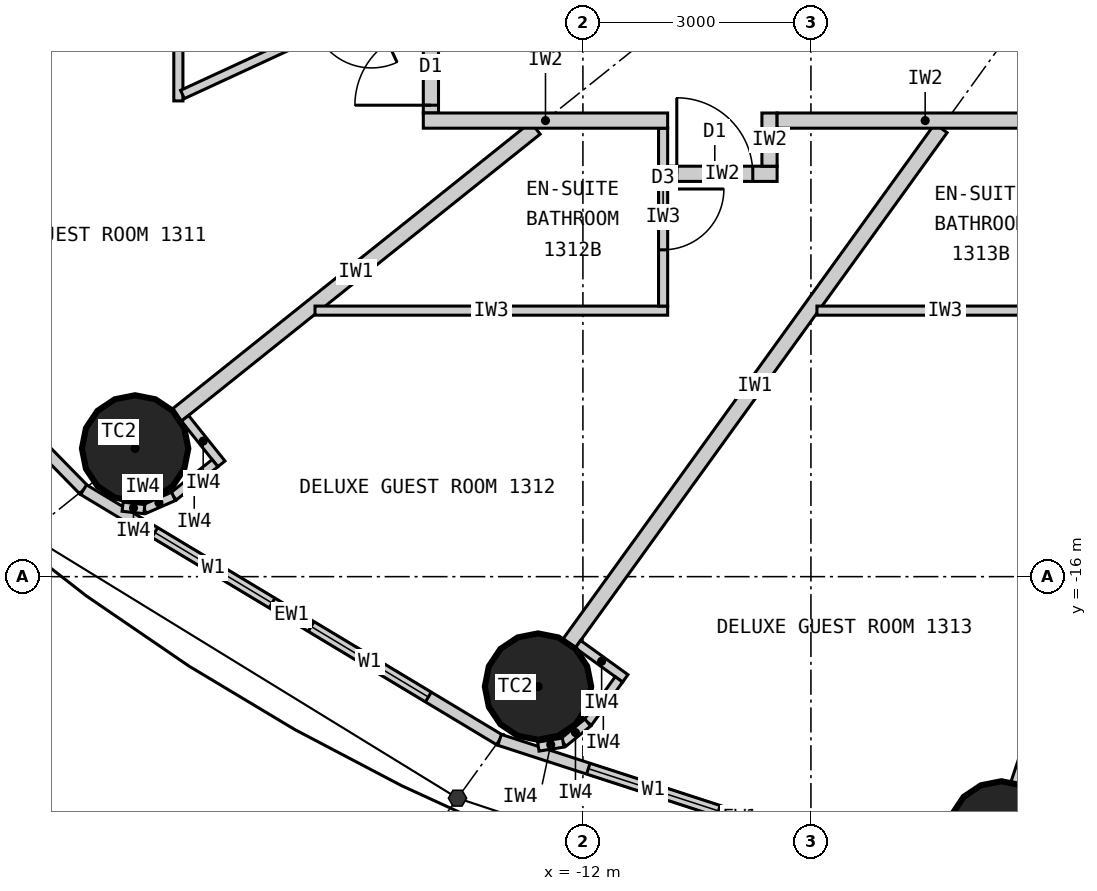
"""IFC4 building model, lengths in metres.
Left out: names, types, materials, properties, quantities, classifications, styles, units other than length and angle.
Written with IfcOpenShell. Run it as: python <this file> out.ifc"""

import sys

from ifc_helpers import new_model, si_unit, direction, frame, frame_2d, origin, origin_2d, place, context, subcontext, project, spatial, rectangle, circle, extrude, element, fill, save


model = new_model("IFC4")
c1 = context("Model", 3, precision=1e-05, world=origin(), true_north=direction((0.0, 1.0)))
c2 = subcontext(c1, "Body", "Model", "MODEL_VIEW")
j1 = project(units=[si_unit("LENGTHUNIT", "METRE"), si_unit("PLANEANGLEUNIT", "RADIAN")], contexts=[c1])
p1 = place(None, origin())
s1 = spatial("IfcSite", under=j1, at=p1, CompositionType="ELEMENT")
p2 = place(p1, origin())
s2 = spatial("IfcBuilding", under=s1, at=p2, CompositionType="ELEMENT")
p3 = place(p2, frame((0.0, 0.0, 57.3)))
s3 = spatial("IfcBuildingStorey", under=s2, at=p3, CompositionType="ELEMENT", Elevation=57.3)
for number, where, z_axis, x_axis in (
    (1, (-17.892, -14.313, 0.0), (0.0, 0.0, 1.0), (1.0, 0.0, 0.0)),
    (2, (-12.591, -17.447, 0.0), (0.0, 0.0, 1.0), (1.0, 0.0, 0.0)),
    (3, (-6.495, -19.391, 0.0), (0.0, 0.0, 1.0), (1.0, 0.0, 0.0)),
):
    element("IfcColumn", number, at=place(p3, frame(where, z_axis=z_axis, x_axis=x_axis)), inside=s3, PredefinedType="COLUMN", context=c2, shape_type="SweptSolid", body=[
        extrude(circle(Radius=0.7, at=origin_2d()), origin(), (0.0, 0.0, 1.0), 3.3),
    ])
p4 = place(p3, frame((-22.803, -10.532, 0.0), z_axis=(0.0, 0.0, 1.0), x_axis=(0.699602905915, -0.714531856557, 0.0)))
e4 = element("IfcWall", 4, at=p4, inside=s3, PredefinedType="ELEMENTEDWALL", context=c2, shape_type="SweptSolid", body=[
    extrude(rectangle(XDim=6.051, YDim=0.15, at=frame_2d((3.025, 0.0))), origin(), (0.0, 0.0, 1.0), 3.12),
])
p5 = place(p4, frame((0.926, 0.0, 0.9)))
e5 = element("IfcOpeningElement", 5, at=p5, cuts=e4, PredefinedType="OPENING", context=c2, shape_type="SweptSolid", body=[
    extrude(rectangle(XDim=1.8, YDim=1.9, at=frame_2d((0.9, 0.95))), frame((0.0, 0.085, 0.0), z_axis=(0.0, -1.0, 0.0), x_axis=(1.0, 0.0, 0.0)), (0.0, 0.0, 1.0), 0.17),
])
p6 = place(p4, frame((3.325, 0.0, 0.9)))
e6 = element("IfcOpeningElement", 6, at=p6, cuts=e4, PredefinedType="OPENING", context=c2, shape_type="SweptSolid", body=[
    extrude(rectangle(XDim=1.8, YDim=1.9, at=frame_2d((0.9, 0.95))), frame((0.0, 0.085, 0.0), z_axis=(0.0, -1.0, 0.0), x_axis=(1.0, 0.0, 0.0)), (0.0, 0.0, 1.0), 0.17),
])
p7 = place(p3, frame((-18.57, -14.856, 0.0), z_axis=(0.0, 0.0, 1.0), x_axis=(0.856983180864, -0.515344377787, 0.0)))
e7 = element("IfcWall", 7, at=p7, inside=s3, PredefinedType="ELEMENTEDWALL", context=c2, shape_type="SweptSolid", body=[
    extrude(rectangle(XDim=6.386, YDim=0.15, at=frame_2d((3.193, 0.0))), origin(), (0.0, 0.0, 1.0), 3.12),
])
p8 = place(p7, frame((1.093, 0.0, 0.9)))
e8 = element("IfcOpeningElement", 8, at=p8, cuts=e7, PredefinedType="OPENING", context=c2, shape_type="SweptSolid", body=[
    extrude(rectangle(XDim=1.8, YDim=1.9, at=frame_2d((0.9, 0.95))), frame((0.0, 0.085, 0.0), z_axis=(0.0, -1.0, 0.0), x_axis=(1.0, 0.0, 0.0)), (0.0, 0.0, 1.0), 0.17),
])
p9 = place(p7, frame((3.493, 0.0, 0.9)))
e9 = element("IfcOpeningElement", 9, at=p9, cuts=e7, PredefinedType="OPENING", context=c2, shape_type="SweptSolid", body=[
    extrude(rectangle(XDim=1.8, YDim=1.9, at=frame_2d((0.9, 0.95))), frame((0.0, 0.085, 0.0), z_axis=(0.0, -1.0, 0.0), x_axis=(1.0, 0.0, 0.0)), (0.0, 0.0, 1.0), 0.17),
])
p10 = place(p3, frame((-13.096, -18.147, 0.0), z_axis=(0.0, 0.0, 1.0), x_axis=(0.951137534625, -0.308767534285, 0.0)))
e10 = element("IfcWall", 10, at=p10, inside=s3, PredefinedType="ELEMENTEDWALL", context=c2, shape_type="SweptSolid", body=[
    extrude(rectangle(XDim=6.655, YDim=0.15, at=frame_2d((3.328, 0.0))), origin(), (0.0, 0.0, 1.0), 3.12),
])
p11 = place(p10, frame((1.228, 0.0, 0.9)))
e11 = element("IfcOpeningElement", 11, at=p11, cuts=e10, PredefinedType="OPENING", context=c2, shape_type="SweptSolid", body=[
    extrude(rectangle(XDim=1.8, YDim=1.9, at=frame_2d((0.9, 0.95))), frame((0.0, 0.085, 0.0), z_axis=(0.0, -1.0, 0.0), x_axis=(1.0, 0.0, 0.0)), (0.0, 0.0, 1.0), 0.17),
])
p12 = place(p10, frame((3.628, 0.0, 0.9)))
e12 = element("IfcOpeningElement", 12, at=p12, cuts=e10, PredefinedType="OPENING", context=c2, shape_type="SweptSolid", body=[
    extrude(rectangle(XDim=1.8, YDim=1.9, at=frame_2d((0.9, 0.95))), frame((0.0, 0.085, 0.0), z_axis=(0.0, -1.0, 0.0), x_axis=(1.0, 0.0, 0.0)), (0.0, 0.0, 1.0), 0.17),
])
p13 = place(p3, frame((-14.1, -6.512, 0.0), z_axis=(0.0, 0.0, 1.0), x_axis=(-0.907832871056, -0.419332181247, 0.0)))
e13 = element("IfcWall", 13, at=p13, inside=s3, PredefinedType="PARTITIONING", context=c2, shape_type="SweptSolid", body=[
    extrude(rectangle(XDim=8.023, YDim=0.2, at=frame_2d((4.011, 0.0))), origin(), (0.0, 0.0, 1.0), 2.32),
])
p14 = place(p3, frame((-12.625, -10.1, 0.0), z_axis=(0.0, 0.0, 1.0), x_axis=(-0.780892451574, -0.624665493744, 0.0)))
e14 = element("IfcWall", 14, at=p14, inside=s3, PredefinedType="PARTITIONING", context=c2, shape_type="SweptSolid", body=[
    extrude(rectangle(XDim=6.045, YDim=0.2, at=frame_2d((3.022, 0.0))), origin(), (0.0, 0.0, 1.0), 2.32),
])
p15 = place(p3, frame((-7.289, -10.1, 0.0), z_axis=(0.0, 0.0, 1.0), x_axis=(-0.585198353053, -0.810890182197, 0.0)))
e15 = element("IfcWall", 15, at=p15, inside=s3, PredefinedType="PARTITIONING", context=c2, shape_type="SweptSolid", body=[
    extrude(rectangle(XDim=8.36, YDim=0.2, at=frame_2d((4.18, 0.0))), origin(), (0.0, 0.0, 1.0), 2.32),
])
p16 = place(p3, frame((-3.383, -10.1, 0.0), z_axis=(0.0, 0.0, 1.0), x_axis=(-0.31759592231, -0.948226149256, 0.0)))
e16 = element("IfcWall", 16, at=p16, inside=s3, PredefinedType="PARTITIONING", context=c2, shape_type="SweptSolid", body=[
    extrude(rectangle(XDim=9.098, YDim=0.2, at=frame_2d((4.549, 0.0))), origin(), (0.0, 0.0, 1.0), 2.32),
])
p17 = place(p3, frame((-17.323, -8.101, 0.0), z_axis=(0.0, 0.0, 1.0), x_axis=(0.0, -1.0, 0.0)))
e17 = element("IfcWall", 17, at=p17, inside=s3, PredefinedType="PARTITIONING", context=c2, shape_type="SweptSolid", body=[
    extrude(rectangle(XDim=1.64, YDim=0.12, at=frame_2d((0.82, 0.0))), origin(), (0.0, 0.0, 1.0), 3.12),
])
p18 = place(p3, frame((-14.1, -8.193, 0.0), z_axis=(0.0, 0.0, 1.0), x_axis=(-0.907836493557, -0.419324338628, 0.0)))
e18 = element("IfcWall", 18, at=p18, inside=s3, PredefinedType="PARTITIONING", context=c2, shape_type="SweptSolid", body=[
    extrude(rectangle(XDim=3.49, YDim=0.12, at=frame_2d((1.745, 0.0))), origin(), (0.0, 0.0, 1.0), 3.12),
])
p19 = place(p18, frame((0.75, 0.0, 0.0)))
e19 = element("IfcOpeningElement", 19, at=p19, cuts=e18, PredefinedType="OPENING", context=c2, shape_type="SweptSolid", body=[
    extrude(rectangle(XDim=0.8, YDim=2.1, at=frame_2d((0.4, 1.05))), frame((0.0, 0.07, 0.0), z_axis=(0.0, -1.0, 0.0), x_axis=(1.0, 0.0, 0.0)), (0.0, 0.0, 1.0), 0.14),
])
p20 = place(p3, frame((-15.525, -12.5, 0.0), z_axis=(0.0, 0.0, 1.0), x_axis=(1.0, 0.0, 0.0)))
e20 = element("IfcWall", 20, at=p20, inside=s3, PredefinedType="PARTITIONING", context=c2, shape_type="SweptSolid", body=[
    extrude(rectangle(XDim=4.64, YDim=0.12, at=frame_2d((2.32, 0.0))), origin(), (0.0, 0.0, 1.0), 3.12),
])
p21 = place(p3, frame((-10.945, -10.1, 0.0), z_axis=(0.0, 0.0, 1.0), x_axis=(0.0, -1.0, 0.0)))
e21 = element("IfcWall", 21, at=p21, inside=s3, PredefinedType="PARTITIONING", context=c2, shape_type="SweptSolid", body=[
    extrude(rectangle(XDim=2.34, YDim=0.12, at=frame_2d((1.17, 0.0))), origin(), (0.0, 0.0, 1.0), 3.12),
])
p22 = place(p21, frame((0.8, 0.0, 0.0)))
e22 = element("IfcOpeningElement", 22, at=p22, cuts=e21, PredefinedType="OPENING", context=c2, shape_type="SweptSolid", body=[
    extrude(rectangle(XDim=0.8, YDim=2.1, at=frame_2d((0.4, 1.05))), frame((0.0, 0.07, 0.0), z_axis=(0.0, -1.0, 0.0), x_axis=(1.0, 0.0, 0.0)), (0.0, 0.0, 1.0), 0.14),
])
p23 = place(p3, frame((-8.921, -12.5, 0.0), z_axis=(0.0, 0.0, 1.0), x_axis=(1.0, 0.0, 0.0)))
e23 = element("IfcWall", 23, at=p23, inside=s3, PredefinedType="PARTITIONING", context=c2, shape_type="SweptSolid", body=[
    extrude(rectangle(XDim=3.372, YDim=0.12, at=frame_2d((1.686, 0.0))), origin(), (0.0, 0.0, 1.0), 3.12),
])
p24 = place(p3, frame((-9.445, -10.7, 0.0), z_axis=(0.0, 0.0, 1.0), x_axis=(-1.0, 0.0, 0.0)))
e24 = element("IfcWall", 24, at=p24, inside=s3, PredefinedType="PARTITIONING", context=c2, shape_type="SweptSolid", body=[
    extrude(rectangle(XDim=1.44, YDim=0.2, at=frame_2d((0.72, 0.0))), origin(), (0.0, 0.0, 1.0), 3.12),
])
p25 = place(p24, frame((0.32, 0.0, 0.0)))
e25 = element("IfcOpeningElement", 25, at=p25, cuts=e24, PredefinedType="OPENING", context=c2, shape_type="SweptSolid", body=[
    extrude(rectangle(XDim=1.0, YDim=2.2, at=frame_2d((0.5, 1.1))), frame((0.0, 0.11, 0.0), z_axis=(0.0, -1.0, 0.0), x_axis=(1.0, 0.0, 0.0)), (0.0, 0.0, 1.0), 0.22),
])
p26 = place(p3, frame((-9.545, -9.9, 0.0), z_axis=(0.0, 0.0, 1.0), x_axis=(0.0, -1.0, 0.0)))
e26 = element("IfcWall", 26, at=p26, inside=s3, PredefinedType="PARTITIONING", context=c2, shape_type="SweptSolid", body=[
    extrude(rectangle(XDim=0.7, YDim=0.2, at=frame_2d((0.35, 0.0))), origin(), (0.0, 0.0, 1.0), 3.12),
])
p27 = place(p3, frame((-14.0, -4.772, 0.0), z_axis=(0.0, 0.0, 1.0), x_axis=(0.0, -1.0, 0.0)))
e27 = element("IfcWall", 27, at=p27, inside=s3, PredefinedType="PARTITIONING", context=c2, shape_type="SweptSolid", body=[
    extrude(rectangle(XDim=5.127, YDim=0.2, at=frame_2d((2.564, 0.0))), origin(), (0.0, 0.0, 1.0), 3.12),
])
p28 = place(p27, frame((4.025, 0.0, 0.0)))
e28 = element("IfcOpeningElement", 28, at=p28, cuts=e27, PredefinedType="OPENING", context=c2, shape_type="SweptSolid", body=[
    extrude(rectangle(XDim=1.0, YDim=2.2, at=frame_2d((0.5, 1.1))), frame((0.0, 0.11, 0.0), z_axis=(0.0, -1.0, 0.0), x_axis=(1.0, 0.0, 0.0)), (0.0, 0.0, 1.0), 0.22),
])
p29 = place(p3, frame((-5.549, -10.0, 0.0), z_axis=(0.0, 0.0, 1.0), x_axis=(-1.0, 0.0, 0.0)))
e29 = element("IfcWall", 29, at=p29, inside=s3, PredefinedType="PARTITIONING", context=c2, shape_type="SweptSolid", body=[
    extrude(rectangle(XDim=3.896, YDim=0.2, at=frame_2d((1.948, 0.0))), origin(), (0.0, 0.0, 1.0), 3.12),
])
p30 = place(p3, frame((-10.885, -10.0, 0.0), z_axis=(0.0, 0.0, 1.0), x_axis=(-1.0, 0.0, 0.0)))
e30 = element("IfcWall", 30, at=p30, inside=s3, PredefinedType="PARTITIONING", context=c2, shape_type="SweptSolid", body=[
    extrude(rectangle(XDim=3.215, YDim=0.2, at=frame_2d((1.607, 0.0))), origin(), (0.0, 0.0, 1.0), 3.12),
])
p31 = place(p3, frame((-17.236, -13.917, 0.0), z_axis=(0.0, 0.0, 1.0), x_axis=(0.624695047554, -0.780868809443, 0.0)))
e31 = element("IfcWall", 31, at=p31, inside=s3, PredefinedType="PARTITIONING", context=c2, shape_type="SweptSolid", body=[
    extrude(rectangle(XDim=0.768, YDim=0.12, at=frame_2d((0.384, 0.0))), origin(), (0.0, 0.0, 1.0), 3.12),
])
p32 = place(p3, frame((-16.841, -14.507, 0.0), z_axis=(0.0, 0.0, 1.0), x_axis=(-0.780902834923, -0.62465251333, 0.0)))
e32 = element("IfcWall", 32, at=p32, inside=s3, PredefinedType="PARTITIONING", context=c2, shape_type="SweptSolid", body=[
    extrude(rectangle(XDim=0.7, YDim=0.12, at=frame_2d((0.35, 0.0))), origin(), (0.0, 0.0, 1.0), 3.12),
])
p33 = place(p3, frame((-17.387, -14.944, 0.0), z_axis=(0.0, 0.0, 1.0), x_axis=(-0.916036698064, -0.401094462441, 0.0)))
e33 = element("IfcWall", 33, at=p33, inside=s3, PredefinedType="PARTITIONING", context=c2, shape_type="SweptSolid", body=[
    extrude(rectangle(XDim=0.418, YDim=0.12, at=frame_2d((0.209, 0.0))), origin(), (0.0, 0.0, 1.0), 3.12),
])
p34 = place(p3, frame((-17.77, -15.112, 0.0), z_axis=(0.0, 0.0, 1.0), x_axis=(-0.993904401174, 0.110245368731, 0.0)))
e34 = element("IfcWall", 34, at=p34, inside=s3, PredefinedType="PARTITIONING", context=c2, shape_type="SweptSolid", body=[
    extrude(rectangle(XDim=0.288, YDim=0.12, at=frame_2d((0.144, 0.0))), origin(), (0.0, 0.0, 1.0), 3.12),
])
p35 = place(p3, frame((-12.065, -16.889, 0.0), z_axis=(0.0, 0.0, 1.0), x_axis=(0.810821798253, -0.585293098778, 0.0)))
e35 = element("IfcWall", 35, at=p35, inside=s3, PredefinedType="PARTITIONING", context=c2, shape_type="SweptSolid", body=[
    extrude(rectangle(XDim=0.768, YDim=0.12, at=frame_2d((0.384, 0.0))), origin(), (0.0, 0.0, 1.0), 3.12),
])
p36 = place(p3, frame((-11.526, -17.351, 0.0), z_axis=(0.0, 0.0, 1.0), x_axis=(-0.585223113993, -0.810872312296, 0.0)))
e36 = element("IfcWall", 36, at=p36, inside=s3, PredefinedType="PARTITIONING", context=c2, shape_type="SweptSolid", body=[
    extrude(rectangle(XDim=0.7, YDim=0.12, at=frame_2d((0.35, 0.0))), origin(), (0.0, 0.0, 1.0), 3.12),
])
p37 = place(p3, frame((-11.936, -17.919, 0.0), z_axis=(0.0, 0.0, 1.0), x_axis=(-0.775023088441, -0.631932917629, 0.0)))
e37 = element("IfcWall", 37, at=p37, inside=s3, PredefinedType="PARTITIONING", context=c2, shape_type="SweptSolid", body=[
    extrude(rectangle(XDim=0.418, YDim=0.12, at=frame_2d((0.209, 0.0))), origin(), (0.0, 0.0, 1.0), 3.12),
])
p38 = place(p3, frame((-12.26, -18.183, 0.0), z_axis=(0.0, 0.0, 1.0), x_axis=(-0.987218661664, -0.159371622511, 0.0)))
e38 = element("IfcWall", 38, at=p38, inside=s3, PredefinedType="PARTITIONING", context=c2, shape_type="SweptSolid", body=[
    extrude(rectangle(XDim=0.331, YDim=0.12, at=frame_2d((0.166, 0.0))), origin(), (0.0, 0.0, 1.0), 3.12),
])
p39 = place(p8, origin())
e39 = element("IfcWindow", 39, at=p39, inside=s3, PartitioningType="SINGLE_PANEL", PredefinedType="WINDOW", context=c2, shape_type="SweptSolid", body=[
    extrude(rectangle(XDim=1.8, YDim=1.9, at=frame_2d((0.9, 0.95))), frame((0.0, 0.03, 0.0), z_axis=(0.0, -1.0, 0.0), x_axis=(1.0, 0.0, 0.0)), (0.0, 0.0, 1.0), 0.06),
])
fill(e8, e39)
p40 = place(p9, origin())
e40 = element("IfcWindow", 40, at=p40, inside=s3, PartitioningType="SINGLE_PANEL", PredefinedType="WINDOW", context=c2, shape_type="SweptSolid", body=[
    extrude(rectangle(XDim=1.8, YDim=1.9, at=frame_2d((0.9, 0.95))), frame((0.0, 0.03, 0.0), z_axis=(0.0, -1.0, 0.0), x_axis=(1.0, 0.0, 0.0)), (0.0, 0.0, 1.0), 0.06),
])
fill(e9, e40)
p41 = place(p11, origin())
e41 = element("IfcWindow", 41, at=p41, inside=s3, PartitioningType="SINGLE_PANEL", PredefinedType="WINDOW", context=c2, shape_type="SweptSolid", body=[
    extrude(rectangle(XDim=1.8, YDim=1.9, at=frame_2d((0.9, 0.95))), frame((0.0, 0.03, 0.0), z_axis=(0.0, -1.0, 0.0), x_axis=(1.0, 0.0, 0.0)), (0.0, 0.0, 1.0), 0.06),
])
fill(e11, e41)
p42 = place(p28, origin())
e42 = element("IfcDoor", 42, at=p42, inside=s3, OperationType="SINGLE_SWING_RIGHT", PredefinedType="DOOR", context=c2, shape_type="SweptSolid", body=[
    extrude(rectangle(XDim=1.0, YDim=2.2, at=frame_2d((0.5, 1.1))), frame((0.0, 0.025, 0.0), z_axis=(0.0, -1.0, 0.0), x_axis=(1.0, 0.0, 0.0)), (0.0, 0.0, 1.0), 0.05),
])
fill(e28, e42)
p43 = place(p22, origin())
e43 = element("IfcDoor", 43, at=p43, inside=s3, OperationType="SINGLE_SWING_LEFT", PredefinedType="DOOR", context=c2, shape_type="SweptSolid", body=[
    extrude(rectangle(XDim=0.8, YDim=2.1, at=frame_2d((0.4, 1.05))), frame((0.0, 0.025, 0.0), z_axis=(0.0, -1.0, 0.0), x_axis=(1.0, 0.0, 0.0)), (0.0, 0.0, 1.0), 0.05),
])
fill(e22, e43)
p44 = place(p25, origin())
e44 = element("IfcDoor", 44, at=p44, inside=s3, OperationType="SINGLE_SWING_RIGHT", PredefinedType="DOOR", context=c2, shape_type="SweptSolid", body=[
    extrude(rectangle(XDim=1.0, YDim=2.2, at=frame_2d((0.5, 1.1))), frame((0.0, 0.025, 0.0), z_axis=(0.0, -1.0, 0.0), x_axis=(1.0, 0.0, 0.0)), (0.0, 0.0, 1.0), 0.05),
])
fill(e25, e44)
save(model, sys.argv[1])
